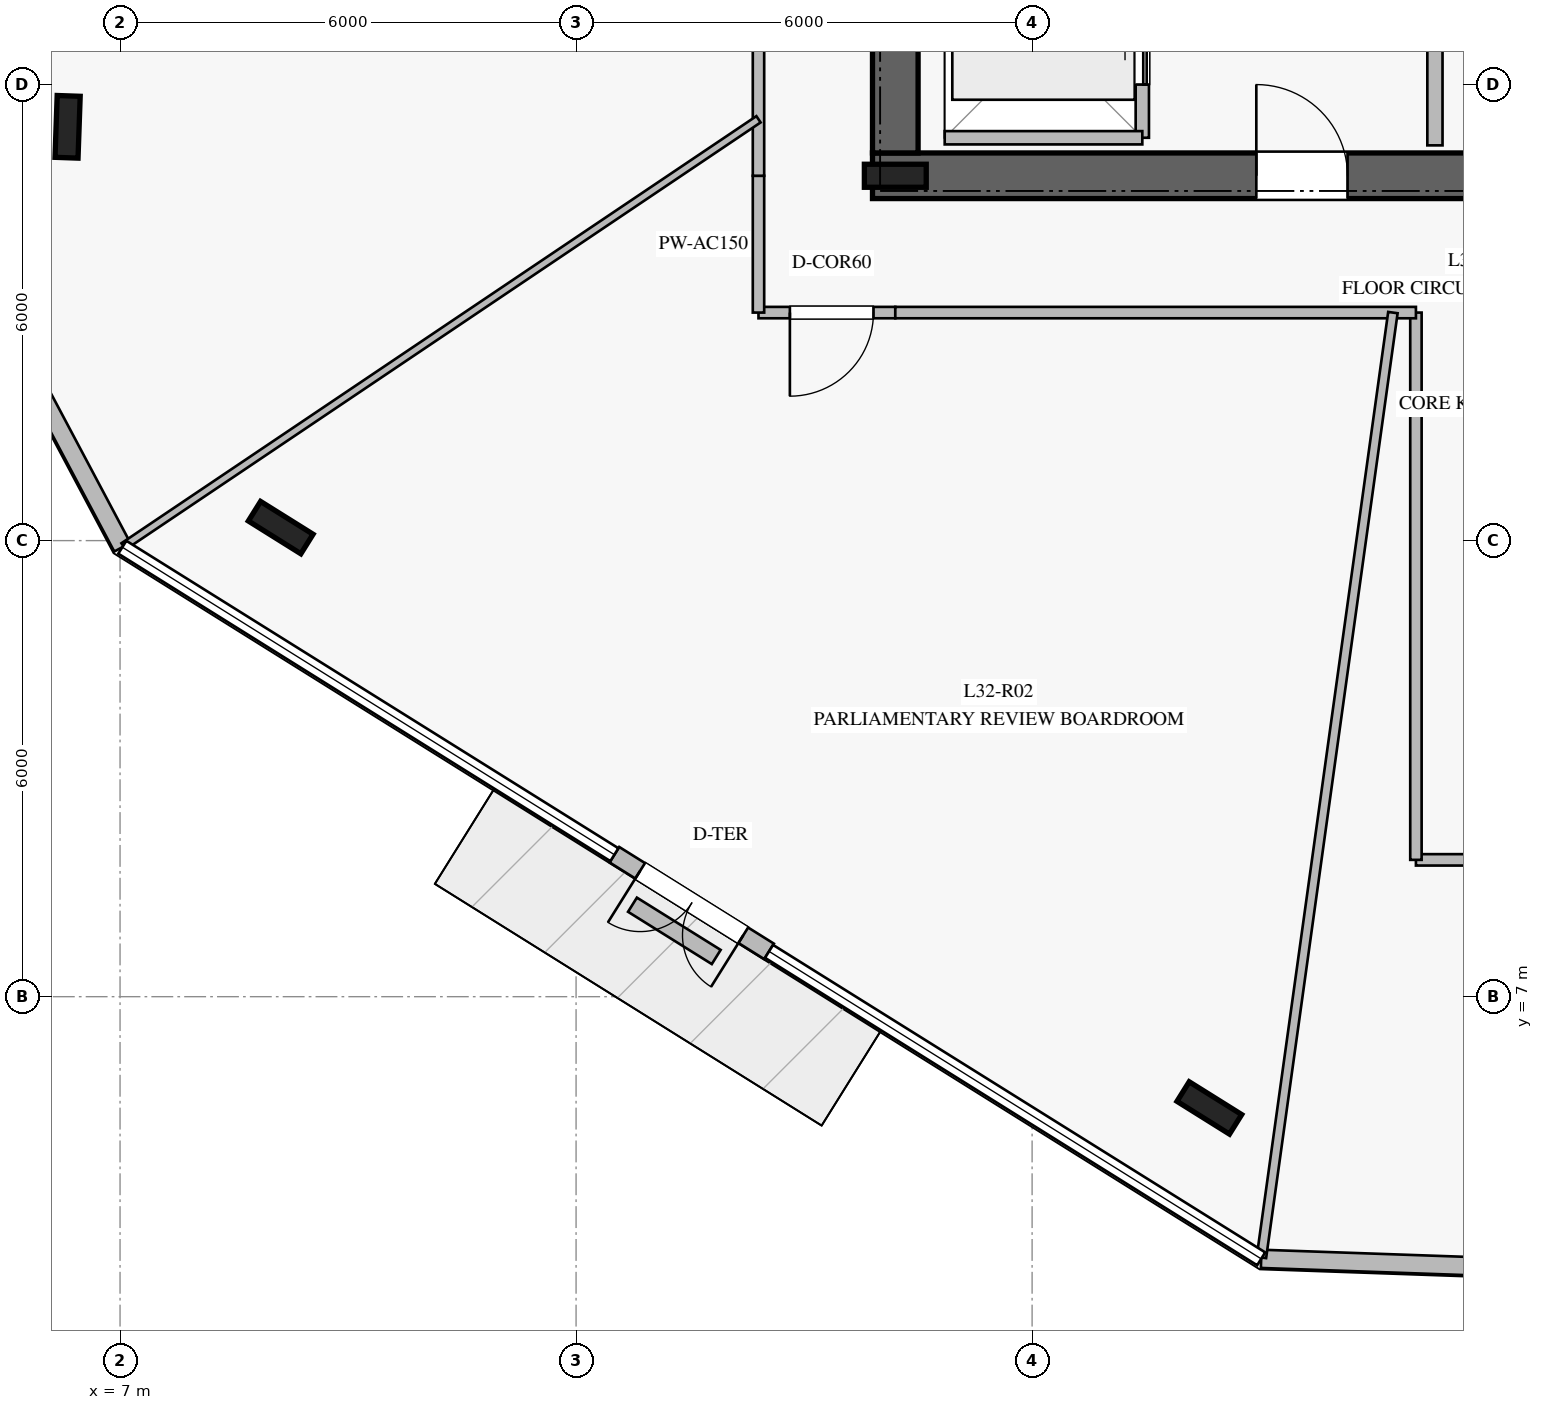
"""IFC4 building model, lengths in metres.
Left out: names, types, materials, properties, quantities, classifications, styles, units other than length and angle.
Written with IfcOpenShell. Run it as: python <this file> out.ifc"""

import sys

from ifc_helpers import new_model, si_unit, direction, frame, frame_2d, origin, origin_2d, place, context, subcontext, project, spatial, rectangle, i_section, extrude, element, fill, save


model = new_model("IFC4")
c1 = context("Model", 3, precision=1e-05, world=origin(), true_north=direction((0.0, 1.0)))
c2 = subcontext(c1, "Body", "Model", "MODEL_VIEW")
j1 = project(units=[si_unit("LENGTHUNIT", "METRE"), si_unit("PLANEANGLEUNIT", "RADIAN")], contexts=[c1])
p1 = place(None, origin())
s1 = spatial("IfcSite", under=j1, at=p1, CompositionType="ELEMENT")
p2 = place(p1, origin())
s2 = spatial("IfcBuilding", under=s1, at=p2, CompositionType="ELEMENT")
p3 = place(p2, frame((0.0, 0.0, 134.4)))
s3 = spatial("IfcBuildingStorey", under=s2, at=p3, CompositionType="ELEMENT", Elevation=134.4)
p4 = place(p3, frame((16.9, 17.8, 0.0), z_axis=(0.0, 0.0, 1.0), x_axis=(1.0, 0.0, 0.0)))
e1 = element("IfcWall", 1, at=p4, inside=s3, PredefinedType="SHEAR", context=c2, shape_type="SweptSolid", body=[
    extrude(rectangle(XDim=16.2, YDim=0.6, at=frame_2d((8.1, 0.0))), origin(), (0.0, 0.0, 1.0), 3.76),
])
p5 = place(p4, frame((5.05, 0.0, 0.0)))
e2 = element("IfcOpeningElement", 2, at=p5, cuts=e1, PredefinedType="OPENING", context=c2, shape_type="SweptSolid", body=[
    extrude(rectangle(XDim=1.2, YDim=2.25, at=frame_2d((0.6, 1.125))), frame((0.0, 0.31, 0.0), z_axis=(0.0, -1.0, 0.0), x_axis=(1.0, 0.0, 0.0)), (0.0, 0.0, 1.0), 0.62),
])
p6 = place(p4, frame((14.0, 0.0, 0.0)))
e3 = element("IfcOpeningElement", 3, at=p6, cuts=e1, PredefinedType="OPENING", context=c2, shape_type="SweptSolid", body=[
    extrude(rectangle(XDim=0.9, YDim=2.1, at=frame_2d((0.45, 1.05))), frame((0.0, 0.31, 0.0), z_axis=(0.0, -1.0, 0.0), x_axis=(1.0, 0.0, 0.0)), (0.0, 0.0, 1.0), 0.62),
])
p7 = place(p4, frame((9.875, 0.0, 0.0)))
e4 = element("IfcOpeningElement", 4, at=p7, cuts=e1, PredefinedType="OPENING", context=c2, shape_type="SweptSolid", body=[
    extrude(rectangle(XDim=1.1, YDim=2.2, at=frame_2d((0.55, 1.1))), frame((0.0, 0.31, 0.0), z_axis=(0.0, -1.0, 0.0), x_axis=(1.0, 0.0, 0.0)), (0.0, 0.0, 1.0), 0.62),
])
p8 = place(p3, frame((17.2, 31.9, 0.0), z_axis=(0.0, 0.0, 1.0), x_axis=(0.0, -1.0, 0.0)))
e5 = element("IfcWall", 5, at=p8, inside=s3, PredefinedType="SHEAR", context=c2, shape_type="SweptSolid", body=[
    extrude(rectangle(XDim=13.8, YDim=0.6, at=frame_2d((6.9, 0.0))), origin(), (0.0, 0.0, 1.0), 3.76),
])
p9 = place(p8, frame((2.05, 0.0, 0.0)))
e6 = element("IfcOpeningElement", 6, at=p9, cuts=e5, PredefinedType="OPENING", context=c2, shape_type="SweptSolid", body=[
    extrude(rectangle(XDim=1.5, YDim=2.2, at=frame_2d((0.75, 1.1))), frame((0.0, 0.31, 0.0), z_axis=(0.0, -1.0, 0.0), x_axis=(1.0, 0.0, 0.0)), (0.0, 0.0, 1.0), 0.62),
])
for number, where, z_axis, x_axis in (
    (7, (17.2, 17.8, 0.0), (0.0, 0.0, 1.0), (1.0, 0.0, 0.0)),
    (8, (6.31, 18.444, 0.0), (0.0, 0.0, 1.0), (0.035, 0.999, 0.0)),
    (9, (9.114, 13.171, 0.0), (0.0, 0.0, 1.0), (-0.848, 0.53, 0.0)),
    (10, (21.332, 5.536, 0.0), (0.0, 0.0, 1.0), (-0.848, 0.53, 0.0)),
):
    element("IfcColumn", number, at=place(p3, frame(where, z_axis=z_axis, x_axis=x_axis)), inside=s3, PredefinedType="COLUMN", context=c2, shape_type="SweptSolid", body=[
        extrude(i_section(OverallWidth=0.303, OverallDepth=0.814, WebThickness=0.021, FlangeThickness=0.04, at=origin_2d()), origin(), (0.0, 0.0, 1.0), 4.0),
    ])
p10 = place(p3, frame((4.932, 16.862, 0.0), z_axis=(0.0, 0.0, 1.0), x_axis=(0.46919913514, -0.883092391307, 0.0)))
e11 = element("IfcWall", 11, at=p10, inside=s3, PredefinedType="STANDARD", context=c2, shape_type="SweptSolid", body=[
    extrude(rectangle(XDim=4.472, YDim=0.24, at=frame_2d((2.236, 0.0))), origin(), (0.0, 0.0, 1.0), 3.76),
])
p11 = place(p3, frame((13.504, 8.868, 0.0), z_axis=(0.0, 0.0, 1.0), x_axis=(0.847998304005, -0.529998940003, 0.0)))
e12 = element("IfcWall", 12, at=p11, inside=s3, PredefinedType="STANDARD", context=c2, shape_type="SweptSolid", body=[
    extrude(rectangle(XDim=2.4, YDim=0.24, at=frame_2d((1.2, 0.0))), origin(), (0.0, 0.0, 1.0), 3.76),
])
p12 = place(p11, frame((0.4, 0.0, 0.0)))
e13 = element("IfcOpeningElement", 13, at=p12, cuts=e12, PredefinedType="OPENING", context=c2, shape_type="SweptSolid", body=[
    extrude(rectangle(XDim=1.6, YDim=2.25, at=frame_2d((0.8, 1.125))), frame((0.0, 0.13, 0.0), z_axis=(0.0, -1.0, 0.0), x_axis=(1.0, 0.0, 0.0)), (0.0, 0.0, 1.0), 0.26),
])
p13 = place(p3, frame((22.014, 3.551, 0.0), z_axis=(0.0, 0.0, 1.0), x_axis=(0.999390988908, -0.034894860495, 0.0)))
e14 = element("IfcWall", 14, at=p13, inside=s3, PredefinedType="STANDARD", context=c2, shape_type="SweptSolid", body=[
    extrude(rectangle(XDim=4.471, YDim=0.24, at=frame_2d((2.235, 0.0))), origin(), (0.0, 0.0, 1.0), 3.76),
])
p14 = place(p3, frame((13.742, 8.21, 0.0), z_axis=(0.0, 0.0, 1.0), x_axis=(0.848272680747, -0.52955968417, 0.0)))
e15 = element("IfcWall", 15, at=p14, inside=s3, PredefinedType="USERDEFINED", context=c2, shape_type="SweptSolid", body=[
    extrude(rectangle(XDim=1.299, YDim=0.22, at=frame_2d((0.649, 0.0))), origin(), (0.0, 0.0, 1.0), 0.4),
])
p15 = place(p3, frame((24.3, 18.2, 0.0), z_axis=(0.0, 0.0, 1.0), x_axis=(0.0, 1.0, 0.0)))
e16 = element("IfcWall", 16, at=p15, inside=s3, PredefinedType="PARTITIONING", context=c2, shape_type="SweptSolid", body=[
    extrude(rectangle(XDim=5.15, YDim=0.2, at=frame_2d((2.575, 0.0))), origin(), (0.0, 0.0, 1.0), 3.76),
])
p16 = place(p3, frame((20.45, 18.3, 0.0), z_axis=(0.0, 0.0, 1.0), x_axis=(0.0, 1.0, 0.0)))
e17 = element("IfcWall", 17, at=p16, inside=s3, PredefinedType="PARTITIONING", context=c2, shape_type="SweptSolid", body=[
    extrude(rectangle(XDim=2.6, YDim=0.175, at=frame_2d((1.3, 0.0))), origin(), (0.0, 0.0, 1.0), 3.76),
])
p17 = place(p16, frame((0.7, 0.0, 0.0)))
e18 = element("IfcOpeningElement", 18, at=p17, cuts=e17, PredefinedType="OPENING", context=c2, shape_type="SweptSolid", body=[
    extrude(rectangle(XDim=1.2, YDim=2.2, at=frame_2d((0.6, 1.1))), frame((0.0, 0.098, 0.0), z_axis=(0.0, -1.0, 0.0), x_axis=(1.0, 0.0, 0.0)), (0.0, 0.0, 1.0), 0.195),
])
p18 = place(p3, frame((17.85, 18.3, 0.0), z_axis=(0.0, 0.0, 1.0), x_axis=(1.0, 0.0, 0.0)))
e19 = element("IfcWall", 19, at=p18, inside=s3, PredefinedType="PARTITIONING", context=c2, shape_type="SweptSolid", body=[
    extrude(rectangle(XDim=2.6, YDim=0.175, at=frame_2d((1.3, 0.0))), origin(), (0.0, 0.0, 1.0), 3.76),
])
p19 = place(p3, frame((17.2, 16.0, 0.0), z_axis=(0.0, 0.0, 1.0), x_axis=(-1.0, 0.0, 0.0)))
e20 = element("IfcWall", 20, at=p19, inside=s3, PredefinedType="PARTITIONING", context=c2, shape_type="SweptSolid", body=[
    extrude(rectangle(XDim=1.8, YDim=0.15, at=frame_2d((0.9, 0.0))), origin(), (0.0, 0.0, 1.0), 3.36),
])
p20 = place(p19, frame((0.287, 0.0, 0.0)))
e21 = element("IfcOpeningElement", 21, at=p20, cuts=e20, PredefinedType="OPENING", context=c2, shape_type="SweptSolid", body=[
    extrude(rectangle(XDim=1.1, YDim=2.2, at=frame_2d((0.55, 1.1))), frame((0.0, 0.085, 0.0), z_axis=(0.0, -1.0, 0.0), x_axis=(1.0, 0.0, 0.0)), (0.0, 0.0, 1.0), 0.17),
])
p21 = place(p3, frame((15.4, 16.0, 0.0), z_axis=(0.0, 0.0, 1.0), x_axis=(0.0, 1.0, 0.0)))
e22 = element("IfcWall", 22, at=p21, inside=s3, PredefinedType="PARTITIONING", context=c2, shape_type="SweptSolid", body=[
    extrude(rectangle(XDim=1.8, YDim=0.15, at=frame_2d((0.9, 0.0))), origin(), (0.0, 0.0, 1.0), 3.21),
])
p22 = place(p3, frame((15.4, 17.8, 0.0), z_axis=(0.0, 0.0, 1.0), x_axis=(0.0, 1.0, 0.0)))
e23 = element("IfcWall", 23, at=p22, inside=s3, PredefinedType="PARTITIONING", context=c2, shape_type="SweptSolid", body=[
    extrude(rectangle(XDim=6.25, YDim=0.15, at=frame_2d((3.125, 0.0))), origin(), (0.0, 0.0, 1.0), 3.21),
])
p23 = place(p22, frame((2.737, 0.0, 0.0)))
e24 = element("IfcOpeningElement", 24, at=p23, cuts=e23, PredefinedType="OPENING", context=c2, shape_type="SweptSolid", body=[
    extrude(rectangle(XDim=1.1, YDim=2.2, at=frame_2d((0.55, 1.1))), frame((0.0, 0.085, 0.0), z_axis=(0.0, -1.0, 0.0), x_axis=(1.0, 0.0, 0.0)), (0.0, 0.0, 1.0), 0.17),
])
p24 = place(p3, frame((25.95, 8.8, 0.0), z_axis=(0.0, 0.0, 1.0), x_axis=(-1.0, 0.0, 0.0)))
e25 = element("IfcWall", 25, at=p24, inside=s3, PredefinedType="PARTITIONING", context=c2, shape_type="SweptSolid", body=[
    extrude(rectangle(XDim=1.9, YDim=0.15, at=frame_2d((0.95, 0.0))), origin(), (0.0, 0.0, 1.0), 3.76),
])
p25 = place(p3, frame((24.05, 8.8, 0.0), z_axis=(0.0, 0.0, 1.0), x_axis=(0.0, 1.0, 0.0)))
e26 = element("IfcWall", 26, at=p25, inside=s3, PredefinedType="PARTITIONING", context=c2, shape_type="SweptSolid", body=[
    extrude(rectangle(XDim=7.2, YDim=0.15, at=frame_2d((3.6, 0.0))), origin(), (0.0, 0.0, 1.0), 3.36),
])
p26 = place(p3, frame((24.05, 16.0, 0.0), z_axis=(0.0, 0.0, 1.0), x_axis=(-1.0, 0.0, 0.0)))
e27 = element("IfcWall", 27, at=p26, inside=s3, PredefinedType="PARTITIONING", context=c2, shape_type="SweptSolid", body=[
    extrude(rectangle(XDim=6.85, YDim=0.15, at=frame_2d((3.425, 0.0))), origin(), (0.0, 0.0, 1.0), 3.21),
])
p27 = place(p3, frame((15.4, 18.543, 0.0), z_axis=(0.0, 0.0, 1.0), x_axis=(-0.829771318012, -0.558103538607, 0.0)))
e28 = element("IfcWall", 28, at=p27, inside=s3, PredefinedType="MOVABLE", context=c2, shape_type="SweptSolid", body=[
    extrude(rectangle(XDim=10.068, YDim=0.1, at=frame_2d((5.034, 0.0))), origin(), (0.0, 0.0, 1.0), 3.16),
])
p28 = place(p3, frame((23.747, 16.0, 0.0), z_axis=(0.0, 0.0, 1.0), x_axis=(-0.137839255744, -0.990454612577, 0.0)))
e29 = element("IfcWall", 29, at=p28, inside=s3, PredefinedType="PARTITIONING", context=c2, shape_type="SweptSolid", body=[
    extrude(rectangle(XDim=12.551, YDim=0.125, at=frame_2d((6.275, 0.0))), origin(), (0.0, 0.0, 1.0), 3.16),
])
p29 = place(p12, frame((1.6, 0.0, 0.0), z_axis=(0.0, 0.0, 1.0), x_axis=(-1.0, 0.0, 0.0)))
e30 = element("IfcDoor", 30, at=p29, inside=s3, OperationType="DOUBLE_DOOR_SINGLE_SWING", PredefinedType="DOOR", context=c2, shape_type="SweptSolid", body=[
    extrude(rectangle(XDim=1.6, YDim=2.25, at=frame_2d((0.8, 1.125))), frame((0.0, 0.025, 0.0), z_axis=(0.0, -1.0, 0.0), x_axis=(1.0, 0.0, 0.0)), (0.0, 0.0, 1.0), 0.05),
])
fill(e13, e30)
p30 = place(p5, origin())
e31 = element("IfcDoor", 31, at=p30, inside=s3, OperationType="SINGLE_SWING_LEFT", PredefinedType="DOOR", context=c2, shape_type="SweptSolid", body=[
    extrude(rectangle(XDim=1.2, YDim=2.25, at=frame_2d((0.6, 1.125))), frame((0.0, 0.025, 0.0), z_axis=(0.0, -1.0, 0.0), x_axis=(1.0, 0.0, 0.0)), (0.0, 0.0, 1.0), 0.05),
])
fill(e2, e31)
p31 = place(p17, origin())
e32 = element("IfcDoor", 32, at=p31, inside=s3, OperationType="DOUBLE_DOOR_SLIDING", PredefinedType="DOOR", context=c2, shape_type="SweptSolid", body=[
    extrude(rectangle(XDim=1.2, YDim=2.2, at=frame_2d((0.6, 1.1))), frame((0.0, 0.025, 0.0), z_axis=(0.0, -1.0, 0.0), x_axis=(1.0, 0.0, 0.0)), (0.0, 0.0, 1.0), 0.05),
])
fill(e18, e32)
p32 = place(p20, origin())
e33 = element("IfcDoor", 33, at=p32, inside=s3, OperationType="SINGLE_SWING_RIGHT", PredefinedType="DOOR", context=c2, shape_type="SweptSolid", body=[
    extrude(rectangle(XDim=1.1, YDim=2.2, at=frame_2d((0.55, 1.1))), frame((0.0, 0.025, 0.0), z_axis=(0.0, -1.0, 0.0), x_axis=(1.0, 0.0, 0.0)), (0.0, 0.0, 1.0), 0.05),
])
fill(e21, e33)
save(model, sys.argv[1])
